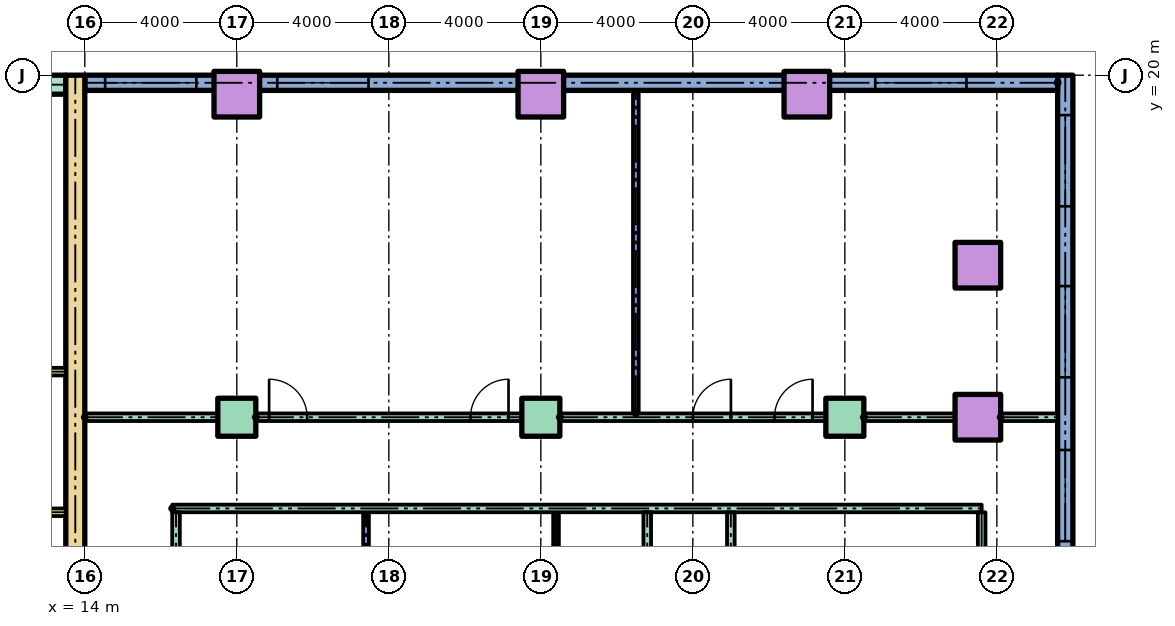
"""IFC4 building model, lengths in metres.
Left out: names, types, materials, properties, quantities, classifications, styles, units other than length and angle.
Written with IfcOpenShell. Run it as: python <this file> out.ifc"""

import sys

from ifc_helpers import new_model, si_unit, direction, frame, frame_2d, origin, origin_2d, place, context, subcontext, project, spatial, rectangle, hollow_rectangle, extrude, element, fill, save


model = new_model("IFC4")
c1 = context("Model", 3, precision=1e-05, world=origin(), true_north=direction((0.0, 1.0)))
c2 = subcontext(c1, "Body", "Model", "MODEL_VIEW")
j1 = project(units=[si_unit("LENGTHUNIT", "METRE"), si_unit("PLANEANGLEUNIT", "RADIAN")], contexts=[c1])
p1 = place(None, origin())
s1 = spatial("IfcSite", under=j1, at=p1, CompositionType="ELEMENT")
p2 = place(p1, origin())
s2 = spatial("IfcBuilding", under=s1, at=p2, CompositionType="ELEMENT")
p3 = place(p2, frame((0.0, 0.0, 14.0)))
s3 = spatial("IfcBuildingStorey", under=s2, at=p3, CompositionType="ELEMENT", Elevation=14.0)
for number, where in (
    (1, (18.0, 11.0, 0.0)),
    (2, (26.0, 11.0, 0.0)),
    (3, (34.0, 11.0, 0.0)),
):
    element("IfcColumn", number, at=place(p3, frame(where)), inside=s3, PredefinedType="COLUMN", context=c2, shape_type="SweptSolid", body=[
        extrude(rectangle(XDim=1.0, YDim=1.0, at=origin_2d()), origin(), (0.0, 0.0, 1.0), 4.0),
    ])
for number, where in (
    (4, (37.5, 11.0, 0.0)),
    (5, (37.5, 15.0, 0.0)),
    (6, (18.0, 19.5, 0.0)),
    (7, (26.0, 19.5, 0.0)),
    (8, (33.0, 19.5, 0.0)),
):
    element("IfcColumn", number, at=place(p3, frame(where)), inside=s3, PredefinedType="COLUMN", context=c2, shape_type="SweptSolid", body=[
        extrude(hollow_rectangle(XDim=1.2, YDim=1.2, WallThickness=0.06, at=origin_2d()), origin(), (0.0, 0.0, 1.0), 4.0),
    ])
p4 = place(p3, frame((39.8, -50.0, 0.0), z_axis=(0.0, 0.0, 1.0), x_axis=(0.0, 1.0, 0.0)))
e9 = element("IfcWall", 9, at=p4, inside=s3, PredefinedType="STANDARD", context=c2, shape_type="SweptSolid", body=[
    extrude(rectangle(XDim=70.0, YDim=0.4, at=frame_2d((35.0, 0.0))), origin(), (0.0, 0.0, 1.0), 3.7),
])
p5 = place(p4, frame((0.75, 0.0, 0.9)))
e10 = element("IfcOpeningElement", 10, at=p5, cuts=e9, PredefinedType="OPENING", context=c2, shape_type="SweptSolid", body=[
    extrude(rectangle(XDim=2.4, YDim=2.1, at=frame_2d((1.2, 1.05))), frame((0.0, 0.21, 0.0), z_axis=(0.0, -1.0, 0.0), x_axis=(1.0, 0.0, 0.0)), (0.0, 0.0, 1.0), 0.42),
])
p6 = place(p4, frame((28.863, 0.0, 0.9)))
e11 = element("IfcOpeningElement", 11, at=p6, cuts=e9, PredefinedType="OPENING", context=c2, shape_type="SweptSolid", body=[
    extrude(rectangle(XDim=2.4, YDim=2.1, at=frame_2d((1.2, 1.05))), frame((0.0, 0.21, 0.0), z_axis=(0.0, -1.0, 0.0), x_axis=(1.0, 0.0, 0.0)), (0.0, 0.0, 1.0), 0.42),
])
p7 = place(p4, frame((32.988, 0.0, 0.9)))
e12 = element("IfcOpeningElement", 12, at=p7, cuts=e9, PredefinedType="OPENING", context=c2, shape_type="SweptSolid", body=[
    extrude(rectangle(XDim=2.4, YDim=2.1, at=frame_2d((1.2, 1.05))), frame((0.0, 0.21, 0.0), z_axis=(0.0, -1.0, 0.0), x_axis=(1.0, 0.0, 0.0)), (0.0, 0.0, 1.0), 0.42),
])
p8 = place(p4, frame((37.113, 0.0, 0.9)))
e13 = element("IfcOpeningElement", 13, at=p8, cuts=e9, PredefinedType="OPENING", context=c2, shape_type="SweptSolid", body=[
    extrude(rectangle(XDim=2.4, YDim=2.1, at=frame_2d((1.2, 1.05))), frame((0.0, 0.21, 0.0), z_axis=(0.0, -1.0, 0.0), x_axis=(1.0, 0.0, 0.0)), (0.0, 0.0, 1.0), 0.42),
])
p9 = place(p4, frame((41.238, 0.0, 0.9)))
e14 = element("IfcOpeningElement", 14, at=p9, cuts=e9, PredefinedType="OPENING", context=c2, shape_type="SweptSolid", body=[
    extrude(rectangle(XDim=2.4, YDim=2.1, at=frame_2d((1.2, 1.05))), frame((0.0, 0.21, 0.0), z_axis=(0.0, -1.0, 0.0), x_axis=(1.0, 0.0, 0.0)), (0.0, 0.0, 1.0), 0.42),
])
p10 = place(p4, frame((45.363, 0.0, 0.9)))
e15 = element("IfcOpeningElement", 15, at=p10, cuts=e9, PredefinedType="OPENING", context=c2, shape_type="SweptSolid", body=[
    extrude(rectangle(XDim=2.4, YDim=2.1, at=frame_2d((1.2, 1.05))), frame((0.0, 0.21, 0.0), z_axis=(0.0, -1.0, 0.0), x_axis=(1.0, 0.0, 0.0)), (0.0, 0.0, 1.0), 0.42),
])
p11 = place(p4, frame((49.488, 0.0, 0.9)))
e16 = element("IfcOpeningElement", 16, at=p11, cuts=e9, PredefinedType="OPENING", context=c2, shape_type="SweptSolid", body=[
    extrude(rectangle(XDim=2.4, YDim=2.1, at=frame_2d((1.2, 1.05))), frame((0.0, 0.21, 0.0), z_axis=(0.0, -1.0, 0.0), x_axis=(1.0, 0.0, 0.0)), (0.0, 0.0, 1.0), 0.42),
])
p12 = place(p4, frame((53.613, 0.0, 0.9)))
e17 = element("IfcOpeningElement", 17, at=p12, cuts=e9, PredefinedType="OPENING", context=c2, shape_type="SweptSolid", body=[
    extrude(rectangle(XDim=2.4, YDim=2.1, at=frame_2d((1.2, 1.05))), frame((0.0, 0.21, 0.0), z_axis=(0.0, -1.0, 0.0), x_axis=(1.0, 0.0, 0.0)), (0.0, 0.0, 1.0), 0.42),
])
p13 = place(p4, frame((57.738, 0.0, 0.9)))
e18 = element("IfcOpeningElement", 18, at=p13, cuts=e9, PredefinedType="OPENING", context=c2, shape_type="SweptSolid", body=[
    extrude(rectangle(XDim=2.4, YDim=2.1, at=frame_2d((1.2, 1.05))), frame((0.0, 0.21, 0.0), z_axis=(0.0, -1.0, 0.0), x_axis=(1.0, 0.0, 0.0)), (0.0, 0.0, 1.0), 0.42),
])
p14 = place(p4, frame((62.05, 0.0, 0.9)))
e19 = element("IfcOpeningElement", 19, at=p14, cuts=e9, PredefinedType="OPENING", context=c2, shape_type="SweptSolid", body=[
    extrude(rectangle(XDim=2.4, YDim=2.1, at=frame_2d((1.2, 1.05))), frame((0.0, 0.21, 0.0), z_axis=(0.0, -1.0, 0.0), x_axis=(1.0, 0.0, 0.0)), (0.0, 0.0, 1.0), 0.42),
])
p15 = place(p4, frame((66.55, 0.0, 0.9)))
e20 = element("IfcOpeningElement", 20, at=p15, cuts=e9, PredefinedType="OPENING", context=c2, shape_type="SweptSolid", body=[
    extrude(rectangle(XDim=2.4, YDim=2.1, at=frame_2d((1.2, 1.05))), frame((0.0, 0.21, 0.0), z_axis=(0.0, -1.0, 0.0), x_axis=(1.0, 0.0, 0.0)), (0.0, 0.0, 1.0), 0.42),
])
p16 = place(p3, frame((39.6, 19.8, 0.0), z_axis=(0.0, 0.0, 1.0), x_axis=(-1.0, 0.0, 0.0)))
e21 = element("IfcWall", 21, at=p16, inside=s3, PredefinedType="STANDARD", context=c2, shape_type="SweptSolid", body=[
    extrude(rectangle(XDim=25.6, YDim=0.4, at=frame_2d((12.8, 0.0))), origin(), (0.0, 0.0, 1.0), 3.7),
])
p17 = place(p16, frame((2.4, 0.0, 0.9)))
e22 = element("IfcOpeningElement", 22, at=p17, cuts=e21, PredefinedType="OPENING", context=c2, shape_type="SweptSolid", body=[
    extrude(rectangle(XDim=2.4, YDim=2.1, at=frame_2d((1.2, 1.05))), frame((0.0, 0.21, 0.0), z_axis=(0.0, -1.0, 0.0), x_axis=(1.0, 0.0, 0.0)), (0.0, 0.0, 1.0), 0.42),
])
p18 = place(p16, frame((18.135, 0.0, 0.9)))
e23 = element("IfcOpeningElement", 23, at=p18, cuts=e21, PredefinedType="OPENING", context=c2, shape_type="SweptSolid", body=[
    extrude(rectangle(XDim=2.4, YDim=2.1, at=frame_2d((1.2, 1.05))), frame((0.0, 0.21, 0.0), z_axis=(0.0, -1.0, 0.0), x_axis=(1.0, 0.0, 0.0)), (0.0, 0.0, 1.0), 0.42),
])
p19 = place(p16, frame((22.665, 0.0, 0.9)))
e24 = element("IfcOpeningElement", 24, at=p19, cuts=e21, PredefinedType="OPENING", context=c2, shape_type="SweptSolid", body=[
    extrude(rectangle(XDim=2.4, YDim=2.1, at=frame_2d((1.2, 1.05))), frame((0.0, 0.21, 0.0), z_axis=(0.0, -1.0, 0.0), x_axis=(1.0, 0.0, 0.0)), (0.0, 0.0, 1.0), 0.42),
])
p20 = place(p3, frame((13.75, 3.0, 0.0), z_axis=(0.0, 0.0, 1.0), x_axis=(0.0, 1.0, 0.0)))
e25 = element("IfcWall", 25, at=p20, inside=s3, PredefinedType="SHEAR", context=c2, shape_type="SweptSolid", body=[
    extrude(rectangle(XDim=17.0, YDim=0.5, at=frame_2d((8.5, 0.0))), origin(), (0.0, 0.0, 1.0), 3.7),
])
p21 = place(p3, frame((-13.5, 19.75, 0.0)))
e26 = element("IfcWall", 26, at=p21, inside=s3, PredefinedType="SHEAR", context=c2, shape_type="SweptSolid", body=[
    extrude(rectangle(XDim=27.0, YDim=0.5, at=frame_2d((13.5, 0.0))), origin(), (0.0, 0.0, 1.0), 3.7),
])
for number, where in (
    (27, (9.6, 8.5, 0.0)),
    (28, (9.6, 12.2, 0.0)),
):
    element("IfcWall", number, at=place(p3, frame(where)), inside=s3, PredefinedType="PARTITIONING", context=c2, shape_type="SweptSolid", body=[
        extrude(rectangle(XDim=3.9, YDim=0.2, at=frame_2d((1.95, 0.0))), origin(), (0.0, 0.0, 1.0), 3.7),
    ])
p22 = place(p3, frame((16.3, 8.6, 0.0)))
e29 = element("IfcWall", 29, at=p22, inside=s3, PredefinedType="PARTITIONING", context=c2, shape_type="SweptSolid", body=[
    extrude(rectangle(XDim=21.3, YDim=0.2, at=frame_2d((10.65, 0.0))), origin(), (0.0, 0.0, 1.0), 3.7),
])
p23 = place(p3, frame((14.0, 11.0, 0.0)))
e30 = element("IfcWall", 30, at=p23, inside=s3, PredefinedType="PARTITIONING", context=c2, shape_type="SweptSolid", body=[
    extrude(rectangle(XDim=3.5, YDim=0.2, at=frame_2d((1.75, 0.0))), origin(), (0.0, 0.0, 1.0), 3.7),
])
p24 = place(p3, frame((18.5, 11.0, 0.0)))
e31 = element("IfcWall", 31, at=p24, inside=s3, PredefinedType="PARTITIONING", context=c2, shape_type="SweptSolid", body=[
    extrude(rectangle(XDim=7.0, YDim=0.2, at=frame_2d((3.5, 0.0))), origin(), (0.0, 0.0, 1.0), 3.7),
])
p25 = place(p24, frame((0.35, 0.0, 0.0)))
e32 = element("IfcOpeningElement", 32, at=p25, cuts=e31, PredefinedType="OPENING", context=c2, shape_type="SweptSolid", body=[
    extrude(rectangle(XDim=1.0, YDim=2.1, at=frame_2d((0.5, 1.05))), frame((0.0, 0.11, 0.0), z_axis=(0.0, -1.0, 0.0), x_axis=(1.0, 0.0, 0.0)), (0.0, 0.0, 1.0), 0.22),
])
p26 = place(p24, frame((5.65, 0.0, 0.0)))
e33 = element("IfcOpeningElement", 33, at=p26, cuts=e31, PredefinedType="OPENING", context=c2, shape_type="SweptSolid", body=[
    extrude(rectangle(XDim=1.0, YDim=2.1, at=frame_2d((0.5, 1.05))), frame((0.0, 0.11, 0.0), z_axis=(0.0, -1.0, 0.0), x_axis=(1.0, 0.0, 0.0)), (0.0, 0.0, 1.0), 0.22),
])
p27 = place(p3, frame((26.5, 11.0, 0.0)))
e34 = element("IfcWall", 34, at=p27, inside=s3, PredefinedType="PARTITIONING", context=c2, shape_type="SweptSolid", body=[
    extrude(rectangle(XDim=7.0, YDim=0.2, at=frame_2d((3.5, 0.0))), origin(), (0.0, 0.0, 1.0), 3.7),
])
p28 = place(p27, frame((3.502, 0.0, 0.0)))
e35 = element("IfcOpeningElement", 35, at=p28, cuts=e34, PredefinedType="OPENING", context=c2, shape_type="SweptSolid", body=[
    extrude(rectangle(XDim=1.0, YDim=2.1, at=frame_2d((0.5, 1.05))), frame((0.0, 0.11, 0.0), z_axis=(0.0, -1.0, 0.0), x_axis=(1.0, 0.0, 0.0)), (0.0, 0.0, 1.0), 0.22),
])
p29 = place(p27, frame((5.65, 0.0, 0.0)))
e36 = element("IfcOpeningElement", 36, at=p29, cuts=e34, PredefinedType="OPENING", context=c2, shape_type="SweptSolid", body=[
    extrude(rectangle(XDim=1.0, YDim=2.1, at=frame_2d((0.5, 1.05))), frame((0.0, 0.11, 0.0), z_axis=(0.0, -1.0, 0.0), x_axis=(1.0, 0.0, 0.0)), (0.0, 0.0, 1.0), 0.22),
])
p30 = place(p3, frame((34.5, 11.0, 0.0)))
e37 = element("IfcWall", 37, at=p30, inside=s3, PredefinedType="PARTITIONING", context=c2, shape_type="SweptSolid", body=[
    extrude(rectangle(XDim=2.4, YDim=0.2, at=frame_2d((1.2, 0.0))), origin(), (0.0, 0.0, 1.0), 3.7),
])
p31 = place(p3, frame((38.1, 11.0, 0.0)))
e38 = element("IfcWall", 38, at=p31, inside=s3, PredefinedType="PARTITIONING", context=c2, shape_type="SweptSolid", body=[
    extrude(rectangle(XDim=1.5, YDim=0.2, at=frame_2d((0.75, 0.0))), origin(), (0.0, 0.0, 1.0), 3.7),
])
p32 = place(p3, frame((16.4, 1.5, 0.0), z_axis=(0.0, 0.0, 1.0), x_axis=(0.0, 1.0, 0.0)))
e39 = element("IfcWall", 39, at=p32, inside=s3, PredefinedType="PARTITIONING", context=c2, shape_type="SweptSolid", body=[
    extrude(rectangle(XDim=7.0, YDim=0.2, at=frame_2d((3.5, 0.0))), origin(), (0.0, 0.0, 1.0), 3.7),
])
p33 = place(p3, frame((21.4, 1.5, 0.0), z_axis=(0.0, 0.0, 1.0), x_axis=(0.0, 1.0, 0.0)))
e40 = element("IfcWall", 40, at=p33, inside=s3, PredefinedType="PARTITIONING", context=c2, shape_type="SweptSolid", body=[
    extrude(rectangle(XDim=7.0, YDim=0.15, at=frame_2d((3.5, 0.0))), origin(), (0.0, 0.0, 1.0), 3.7),
])
p34 = place(p3, frame((26.4, 2.5, 0.0), z_axis=(0.0, 0.0, 1.0), x_axis=(0.0, 1.0, 0.0)))
e41 = element("IfcWall", 41, at=p34, inside=s3, PredefinedType="PARTITIONING", context=c2, shape_type="SweptSolid", body=[
    extrude(rectangle(XDim=6.0, YDim=0.15, at=frame_2d((3.0, 0.0))), origin(), (0.0, 0.0, 1.0), 3.7),
])
p35 = place(p3, frame((28.5, 11.1, 0.0), z_axis=(0.0, 0.0, 1.0), x_axis=(0.0, 1.0, 0.0)))
e42 = element("IfcWall", 42, at=p35, inside=s3, PredefinedType="PARTITIONING", context=c2, shape_type="SweptSolid", body=[
    extrude(rectangle(XDim=8.5, YDim=0.15, at=frame_2d((4.25, 0.0))), origin(), (0.0, 0.0, 1.0), 3.7),
])
for number, where, z_axis, x_axis in (
    (43, (28.8, 1.5, 0.0), (0.0, 0.0, 1.0), (0.0, 1.0, 0.0)),
    (44, (31.0, 1.5, 0.0), (0.0, 0.0, 1.0), (0.0, 1.0, 0.0)),
):
    element("IfcWall", number, at=place(p3, frame(where, z_axis=z_axis, x_axis=x_axis)), inside=s3, PredefinedType="PARTITIONING", context=c2, shape_type="SweptSolid", body=[
        extrude(rectangle(XDim=7.0, YDim=0.2, at=frame_2d((3.5, 0.0))), origin(), (0.0, 0.0, 1.0), 3.7),
    ])
p36 = place(p3, frame((37.6, 2.6, 0.0), z_axis=(0.0, 0.0, 1.0), x_axis=(0.0, 1.0, 0.0)))
e45 = element("IfcWall", 45, at=p36, inside=s3, PredefinedType="PARTITIONING", context=c2, shape_type="SweptSolid", body=[
    extrude(rectangle(XDim=5.9, YDim=0.2, at=frame_2d((2.95, 0.0))), origin(), (0.0, 0.0, 1.0), 3.7),
])
p37 = place(p36, frame((1.9, 0.0, 0.0)))
e46 = element("IfcOpeningElement", 46, at=p37, cuts=e45, PredefinedType="OPENING", context=c2, shape_type="SweptSolid", body=[
    extrude(rectangle(XDim=1.0, YDim=2.1, at=frame_2d((0.5, 1.05))), frame((0.0, 0.11, 0.0), z_axis=(0.0, -1.0, 0.0), x_axis=(1.0, 0.0, 0.0)), (0.0, 0.0, 1.0), 0.22),
])
p38 = place(p13, origin())
e47 = element("IfcWindow", 47, at=p38, inside=s3, PartitioningType="SINGLE_PANEL", PredefinedType="WINDOW", context=c2, shape_type="SweptSolid", body=[
    extrude(rectangle(XDim=2.4, YDim=2.1, at=frame_2d((1.2, 1.05))), frame((0.0, 0.03, 0.0), z_axis=(0.0, -1.0, 0.0), x_axis=(1.0, 0.0, 0.0)), (0.0, 0.0, 1.0), 0.06),
])
fill(e18, e47)
p39 = place(p14, origin())
e48 = element("IfcWindow", 48, at=p39, inside=s3, PartitioningType="SINGLE_PANEL", PredefinedType="WINDOW", context=c2, shape_type="SweptSolid", body=[
    extrude(rectangle(XDim=2.4, YDim=2.1, at=frame_2d((1.2, 1.05))), frame((0.0, 0.03, 0.0), z_axis=(0.0, -1.0, 0.0), x_axis=(1.0, 0.0, 0.0)), (0.0, 0.0, 1.0), 0.06),
])
fill(e19, e48)
p40 = place(p15, origin())
e49 = element("IfcWindow", 49, at=p40, inside=s3, PartitioningType="SINGLE_PANEL", PredefinedType="WINDOW", context=c2, shape_type="SweptSolid", body=[
    extrude(rectangle(XDim=2.4, YDim=2.1, at=frame_2d((1.2, 1.05))), frame((0.0, 0.03, 0.0), z_axis=(0.0, -1.0, 0.0), x_axis=(1.0, 0.0, 0.0)), (0.0, 0.0, 1.0), 0.06),
])
fill(e20, e49)
p41 = place(p17, origin())
e50 = element("IfcWindow", 50, at=p41, inside=s3, PartitioningType="SINGLE_PANEL", PredefinedType="WINDOW", context=c2, shape_type="SweptSolid", body=[
    extrude(rectangle(XDim=2.4, YDim=2.1, at=frame_2d((1.2, 1.05))), frame((0.0, 0.03, 0.0), z_axis=(0.0, -1.0, 0.0), x_axis=(1.0, 0.0, 0.0)), (0.0, 0.0, 1.0), 0.06),
])
fill(e22, e50)
p42 = place(p18, origin())
e51 = element("IfcWindow", 51, at=p42, inside=s3, PartitioningType="SINGLE_PANEL", PredefinedType="WINDOW", context=c2, shape_type="SweptSolid", body=[
    extrude(rectangle(XDim=2.4, YDim=2.1, at=frame_2d((1.2, 1.05))), frame((0.0, 0.03, 0.0), z_axis=(0.0, -1.0, 0.0), x_axis=(1.0, 0.0, 0.0)), (0.0, 0.0, 1.0), 0.06),
])
fill(e23, e51)
p43 = place(p19, origin())
e52 = element("IfcWindow", 52, at=p43, inside=s3, PartitioningType="SINGLE_PANEL", PredefinedType="WINDOW", context=c2, shape_type="SweptSolid", body=[
    extrude(rectangle(XDim=2.4, YDim=2.1, at=frame_2d((1.2, 1.05))), frame((0.0, 0.03, 0.0), z_axis=(0.0, -1.0, 0.0), x_axis=(1.0, 0.0, 0.0)), (0.0, 0.0, 1.0), 0.06),
])
fill(e24, e52)
p44 = place(p25, origin())
e53 = element("IfcDoor", 53, at=p44, inside=s3, OperationType="SINGLE_SWING_LEFT", PredefinedType="DOOR", context=c2, shape_type="SweptSolid", body=[
    extrude(rectangle(XDim=1.0, YDim=2.1, at=frame_2d((0.5, 1.05))), frame((0.0, 0.025, 0.0), z_axis=(0.0, -1.0, 0.0), x_axis=(1.0, 0.0, 0.0)), (0.0, 0.0, 1.0), 0.05),
])
fill(e32, e53)
p45 = place(p26, origin())
e54 = element("IfcDoor", 54, at=p45, inside=s3, OperationType="SINGLE_SWING_RIGHT", PredefinedType="DOOR", context=c2, shape_type="SweptSolid", body=[
    extrude(rectangle(XDim=1.0, YDim=2.1, at=frame_2d((0.5, 1.05))), frame((0.0, 0.025, 0.0), z_axis=(0.0, -1.0, 0.0), x_axis=(1.0, 0.0, 0.0)), (0.0, 0.0, 1.0), 0.05),
])
fill(e33, e54)
p46 = place(p28, origin())
e55 = element("IfcDoor", 55, at=p46, inside=s3, OperationType="SINGLE_SWING_RIGHT", PredefinedType="DOOR", context=c2, shape_type="SweptSolid", body=[
    extrude(rectangle(XDim=1.0, YDim=2.1, at=frame_2d((0.5, 1.05))), frame((0.0, 0.025, 0.0), z_axis=(0.0, -1.0, 0.0), x_axis=(1.0, 0.0, 0.0)), (0.0, 0.0, 1.0), 0.05),
])
fill(e35, e55)
p47 = place(p29, origin())
e56 = element("IfcDoor", 56, at=p47, inside=s3, OperationType="SINGLE_SWING_RIGHT", PredefinedType="DOOR", context=c2, shape_type="SweptSolid", body=[
    extrude(rectangle(XDim=1.0, YDim=2.1, at=frame_2d((0.5, 1.05))), frame((0.0, 0.025, 0.0), z_axis=(0.0, -1.0, 0.0), x_axis=(1.0, 0.0, 0.0)), (0.0, 0.0, 1.0), 0.05),
])
fill(e36, e56)
save(model, sys.argv[1])
